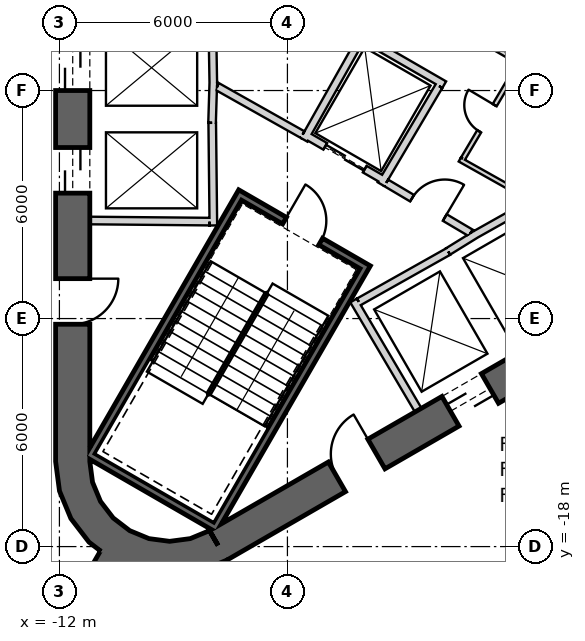
"""IFC4 building model, lengths in metres.
Left out: names, types, materials, properties, quantities, classifications, styles, units other than length and angle.
Written with IfcOpenShell. Run it as: python <this file> out.ifc"""

import sys

from ifc_helpers import new_model, si_unit, direction, frame, frame_2d, origin, place, context, subcontext, project, spatial, polyline, rectangle, outline, extrude, element, fill, save


model = new_model("IFC4")
c1 = context("Model", 3, precision=1e-05, world=origin(), true_north=direction((0.0, 1.0)))
c2 = subcontext(c1, "Body", "Model", "MODEL_VIEW")
j1 = project(units=[si_unit("LENGTHUNIT", "METRE"), si_unit("PLANEANGLEUNIT", "RADIAN")], contexts=[c1])
p1 = place(None, origin())
s1 = spatial("IfcSite", under=j1, at=p1, CompositionType="ELEMENT")
p2 = place(p1, origin())
s2 = spatial("IfcBuilding", under=s1, at=p2, CompositionType="ELEMENT")
p3 = place(p2, frame((0.0, 0.0, 131.6)))
s3 = spatial("IfcBuildingStorey", under=s2, at=p3, CompositionType="ELEMENT", Elevation=131.6)
p4 = place(p3, frame((-11.65, 15.762, 0.0), z_axis=(0.0, 0.0, 1.0), x_axis=(0.0, -1.0, 0.0)))
e1 = element("IfcWall", 1, at=p4, inside=s3, PredefinedType="SHEAR", context=c2, shape_type="SweptSolid", body=[
    extrude(rectangle(XDim=31.523, YDim=0.9, at=frame_2d((15.762, 0.0))), origin(), (0.0, 0.0, 1.0), 4.1),
])
p5 = place(p4, frame((7.062, 0.0, 0.0)))
e2 = element("IfcOpeningElement", 2, at=p5, cuts=e1, PredefinedType="OPENING", context=c2, shape_type="SweptSolid", body=[
    extrude(rectangle(XDim=1.2, YDim=2.4, at=frame_2d((0.6, 1.2))), frame((0.0, 0.46, 0.0), z_axis=(0.0, -1.0, 0.0), x_axis=(1.0, 0.0, 0.0)), (0.0, 0.0, 1.0), 0.92),
])
p6 = place(p4, frame((9.762, 0.0, 0.0)))
e3 = element("IfcOpeningElement", 3, at=p6, cuts=e1, PredefinedType="OPENING", context=c2, shape_type="SweptSolid", body=[
    extrude(rectangle(XDim=1.2, YDim=2.4, at=frame_2d((0.6, 1.2))), frame((0.0, 0.46, 0.0), z_axis=(0.0, -1.0, 0.0), x_axis=(1.0, 0.0, 0.0)), (0.0, 0.0, 1.0), 0.92),
])
p7 = place(p4, frame((12.462, 0.0, 0.0)))
e4 = element("IfcOpeningElement", 4, at=p7, cuts=e1, PredefinedType="OPENING", context=c2, shape_type="SweptSolid", body=[
    extrude(rectangle(XDim=1.2, YDim=2.4, at=frame_2d((0.6, 1.2))), frame((0.0, 0.46, 0.0), z_axis=(0.0, -1.0, 0.0), x_axis=(1.0, 0.0, 0.0)), (0.0, 0.0, 1.0), 0.92),
])
p8 = place(p4, frame((15.162, 0.0, 0.0)))
e5 = element("IfcOpeningElement", 5, at=p8, cuts=e1, PredefinedType="OPENING", context=c2, shape_type="SweptSolid", body=[
    extrude(rectangle(XDim=1.2, YDim=2.4, at=frame_2d((0.6, 1.2))), frame((0.0, 0.46, 0.0), z_axis=(0.0, -1.0, 0.0), x_axis=(1.0, 0.0, 0.0)), (0.0, 0.0, 1.0), 0.92),
])
p9 = place(p4, frame((17.862, 0.0, 0.0)))
e6 = element("IfcOpeningElement", 6, at=p9, cuts=e1, PredefinedType="OPENING", context=c2, shape_type="SweptSolid", body=[
    extrude(rectangle(XDim=1.2, YDim=2.4, at=frame_2d((0.6, 1.2))), frame((0.0, 0.46, 0.0), z_axis=(0.0, -1.0, 0.0), x_axis=(1.0, 0.0, 0.0)), (0.0, 0.0, 1.0), 0.92),
])
p10 = place(p4, frame((20.562, 0.0, 0.0)))
e7 = element("IfcOpeningElement", 7, at=p10, cuts=e1, PredefinedType="OPENING", context=c2, shape_type="SweptSolid", body=[
    extrude(rectangle(XDim=1.2, YDim=2.4, at=frame_2d((0.6, 1.2))), frame((0.0, 0.46, 0.0), z_axis=(0.0, -1.0, 0.0), x_axis=(1.0, 0.0, 0.0)), (0.0, 0.0, 1.0), 0.92),
])
p11 = place(p4, frame((23.262, 0.0, 0.0)))
e8 = element("IfcOpeningElement", 8, at=p11, cuts=e1, PredefinedType="OPENING", context=c2, shape_type="SweptSolid", body=[
    extrude(rectangle(XDim=1.2, YDim=2.4, at=frame_2d((0.6, 1.2))), frame((0.0, 0.46, 0.0), z_axis=(0.0, -1.0, 0.0), x_axis=(1.0, 0.0, 0.0)), (0.0, 0.0, 1.0), 0.92),
])
p12 = place(p4, frame((3.612, 0.0, 0.0)))
e9 = element("IfcOpeningElement", 9, at=p12, cuts=e1, PredefinedType="OPENING", context=c2, shape_type="SweptSolid", body=[
    extrude(rectangle(XDim=1.2, YDim=2.4, at=frame_2d((0.6, 1.2))), frame((0.0, 0.46, 0.0), z_axis=(0.0, -1.0, 0.0), x_axis=(1.0, 0.0, 0.0)), (0.0, 0.0, 1.0), 0.92),
])
p13 = place(p4, frame((26.712, 0.0, 0.0)))
e10 = element("IfcOpeningElement", 10, at=p13, cuts=e1, PredefinedType="OPENING", context=c2, shape_type="SweptSolid", body=[
    extrude(rectangle(XDim=1.2, YDim=2.4, at=frame_2d((0.6, 1.2))), frame((0.0, 0.46, 0.0), z_axis=(0.0, -1.0, 0.0), x_axis=(1.0, 0.0, 0.0)), (0.0, 0.0, 1.0), 0.92),
])
p14 = place(p3, frame((-7.825, -17.97, 0.0), z_axis=(0.0, 0.0, 1.0), x_axis=(0.866028369851, 0.499994862586, 0.0)))
e11 = element("IfcWall", 11, at=p14, inside=s3, PredefinedType="SHEAR", context=c2, shape_type="SweptSolid", body=[
    extrude(rectangle(XDim=31.523, YDim=0.9, at=frame_2d((15.762, 0.0))), origin(), (0.0, 0.0, 1.0), 4.1),
])
p15 = place(p14, frame((7.062, 0.0, 0.0)))
e12 = element("IfcOpeningElement", 12, at=p15, cuts=e11, PredefinedType="OPENING", context=c2, shape_type="SweptSolid", body=[
    extrude(rectangle(XDim=1.2, YDim=2.4, at=frame_2d((0.6, 1.2))), frame((0.0, 0.46, 0.0), z_axis=(0.0, -1.0, 0.0), x_axis=(1.0, 0.0, 0.0)), (0.0, 0.0, 1.0), 0.92),
])
p16 = place(p14, frame((9.762, 0.0, 0.0)))
e13 = element("IfcOpeningElement", 13, at=p16, cuts=e11, PredefinedType="OPENING", context=c2, shape_type="SweptSolid", body=[
    extrude(rectangle(XDim=1.2, YDim=2.4, at=frame_2d((0.6, 1.2))), frame((0.0, 0.46, 0.0), z_axis=(0.0, -1.0, 0.0), x_axis=(1.0, 0.0, 0.0)), (0.0, 0.0, 1.0), 0.92),
])
p17 = place(p14, frame((12.462, 0.0, 0.0)))
e14 = element("IfcOpeningElement", 14, at=p17, cuts=e11, PredefinedType="OPENING", context=c2, shape_type="SweptSolid", body=[
    extrude(rectangle(XDim=1.2, YDim=2.4, at=frame_2d((0.6, 1.2))), frame((0.0, 0.46, 0.0), z_axis=(0.0, -1.0, 0.0), x_axis=(1.0, 0.0, 0.0)), (0.0, 0.0, 1.0), 0.92),
])
p18 = place(p14, frame((15.162, 0.0, 0.0)))
e15 = element("IfcOpeningElement", 15, at=p18, cuts=e11, PredefinedType="OPENING", context=c2, shape_type="SweptSolid", body=[
    extrude(rectangle(XDim=1.2, YDim=2.4, at=frame_2d((0.6, 1.2))), frame((0.0, 0.46, 0.0), z_axis=(0.0, -1.0, 0.0), x_axis=(1.0, 0.0, 0.0)), (0.0, 0.0, 1.0), 0.92),
])
p19 = place(p14, frame((17.862, 0.0, 0.0)))
e16 = element("IfcOpeningElement", 16, at=p19, cuts=e11, PredefinedType="OPENING", context=c2, shape_type="SweptSolid", body=[
    extrude(rectangle(XDim=1.2, YDim=2.4, at=frame_2d((0.6, 1.2))), frame((0.0, 0.46, 0.0), z_axis=(0.0, -1.0, 0.0), x_axis=(1.0, 0.0, 0.0)), (0.0, 0.0, 1.0), 0.92),
])
p20 = place(p14, frame((20.562, 0.0, 0.0)))
e17 = element("IfcOpeningElement", 17, at=p20, cuts=e11, PredefinedType="OPENING", context=c2, shape_type="SweptSolid", body=[
    extrude(rectangle(XDim=1.2, YDim=2.4, at=frame_2d((0.6, 1.2))), frame((0.0, 0.46, 0.0), z_axis=(0.0, -1.0, 0.0), x_axis=(1.0, 0.0, 0.0)), (0.0, 0.0, 1.0), 0.92),
])
p21 = place(p14, frame((26.712, 0.0, 0.0)))
e18 = element("IfcOpeningElement", 18, at=p21, cuts=e11, PredefinedType="OPENING", context=c2, shape_type="SweptSolid", body=[
    extrude(rectangle(XDim=1.2, YDim=2.4, at=frame_2d((0.6, 1.2))), frame((0.0, 0.46, 0.0), z_axis=(0.0, -1.0, 0.0), x_axis=(1.0, 0.0, 0.0)), (0.0, 0.0, 1.0), 0.92),
])
p22 = place(p14, frame((3.612, 0.0, 0.0)))
e19 = element("IfcOpeningElement", 19, at=p22, cuts=e11, PredefinedType="OPENING", context=c2, shape_type="SweptSolid", body=[
    extrude(rectangle(XDim=1.2, YDim=2.4, at=frame_2d((0.6, 1.2))), frame((0.0, 0.46, 0.0), z_axis=(0.0, -1.0, 0.0), x_axis=(1.0, 0.0, 0.0)), (0.0, 0.0, 1.0), 0.92),
])
p23 = place(p3, origin())
e20 = element("IfcWall", 20, at=p23, inside=s3, PredefinedType="SHEAR", context=c2, shape_type="SweptSolid", body=[
    extrude(outline(polyline([(-12.1, -15.762), (-11.998, -16.538), (-11.698, -17.262), (-11.221, -17.883), (-10.6, -18.36), (-9.876, -18.659), (-9.1, -18.762), (-8.323, -18.659), (-7.6, -18.36), (-8.05, -17.58), (-8.556, -17.79), (-9.1, -17.862), (-9.644, -17.79), (-10.15, -17.58), (-10.585, -17.247), (-10.919, -16.812), (-11.128, -16.305), (-11.2, -15.762), (-12.1, -15.762)])), origin(), (0.0, 0.0, 1.0), 4.1),
])
p24 = place(p3, frame((-10.575, -18.316, 0.0), z_axis=(0.0, 0.0, 1.0), x_axis=(-0.500005394759, -0.866022289097, 0.0)))
e21 = element("IfcWall", 21, at=p24, inside=s3, PredefinedType="SHEAR", context=c2, shape_type="SweptSolid", body=[
    extrude(rectangle(XDim=12.598, YDim=0.8, at=frame_2d((6.299, 0.0))), origin(), (0.0, 0.0, 1.0), 4.1),
])
p25 = place(p24, frame((1.3, 0.0, 0.0)))
e22 = element("IfcOpeningElement", 22, at=p25, cuts=e21, PredefinedType="OPENING", context=c2, shape_type="SweptSolid", body=[
    extrude(rectangle(XDim=1.4, YDim=2.4, at=frame_2d((0.7, 1.2))), frame((0.0, 0.41, 0.0), z_axis=(0.0, -1.0, 0.0), x_axis=(1.0, 0.0, 0.0)), (0.0, 0.0, 1.0), 0.82),
])
p26 = place(p3, frame((-7.95, -5.772, 0.0), z_axis=(0.0, 0.0, 1.0), x_axis=(-0.030803413295, -0.999525462272, 0.0)))
e23 = element("IfcWall", 23, at=p26, inside=s3, PredefinedType="PLUMBINGWALL", context=c2, shape_type="SweptSolid", body=[
    extrude(rectangle(XDim=1.078, YDim=0.2, at=frame_2d((0.539, 0.0))), origin(), (0.0, 0.0, 1.0), 3.8),
])
p27 = place(p3, frame((-7.98, -4.05, 0.0), z_axis=(0.0, 0.0, 1.0), x_axis=(0.016809909365, -0.999858703491, 0.0)))
e24 = element("IfcWall", 24, at=p27, inside=s3, PredefinedType="PLUMBINGWALL", context=c2, shape_type="SweptSolid", body=[
    extrude(rectangle(XDim=1.844, YDim=0.2, at=frame_2d((0.922, 0.0))), origin(), (0.0, 0.0, 1.0), 3.8),
])
p28 = place(p3, frame((-7.979, -6.85, 0.0), z_axis=(0.0, 0.0, 1.0), x_axis=(0.011121475088, -0.999938154483, 0.0)))
e25 = element("IfcWall", 25, at=p28, inside=s3, PredefinedType="PLUMBINGWALL", context=c2, shape_type="SweptSolid", body=[
    extrude(rectangle(XDim=2.7, YDim=0.2, at=frame_2d((1.35, 0.0))), origin(), (0.0, 0.0, 1.0), 3.8),
])
p29 = place(p3, frame((-8.05, -9.449, 0.0), z_axis=(0.0, 0.0, 1.0), x_axis=(-0.999957467379, 0.009222983926, 0.0)))
e26 = element("IfcWall", 26, at=p29, inside=s3, PredefinedType="PLUMBINGWALL", context=c2, shape_type="SweptSolid", body=[
    extrude(rectangle(XDim=3.15, YDim=0.2, at=frame_2d((1.575, 0.0))), origin(), (0.0, 0.0, 1.0), 3.8),
])
p30 = place(p3, frame((-2.558, -14.409, 0.0), z_axis=(0.0, 0.0, 1.0), x_axis=(-0.507997497166, 0.861358544901, 0.0)))
e27 = element("IfcWall", 27, at=p30, inside=s3, PredefinedType="PLUMBINGWALL", context=c2, shape_type="SweptSolid", body=[
    extrude(rectangle(XDim=3.35, YDim=0.2, at=frame_2d((1.675, 0.0))), origin(), (0.0, 0.0, 1.0), 3.8),
])
p31 = place(p3, frame((-1.769, -10.237, 0.0), z_axis=(0.0, 0.0, 1.0), x_axis=(-0.871534483978, -0.490334215854, 0.0)))
e28 = element("IfcWall", 28, at=p31, inside=s3, PredefinedType="PLUMBINGWALL", context=c2, shape_type="SweptSolid", body=[
    extrude(rectangle(XDim=2.7, YDim=0.2, at=frame_2d((1.35, 0.0))), origin(), (0.0, 0.0, 1.0), 3.8),
])
p32 = place(p3, frame((-1.024, -9.771, 0.0), z_axis=(0.0, 0.0, 1.0), x_axis=(-0.850348075135, -0.526220629693, 0.0)))
e29 = element("IfcWall", 29, at=p32, inside=s3, PredefinedType="PLUMBINGWALL", context=c2, shape_type="SweptSolid", body=[
    extrude(rectangle(XDim=0.878, YDim=0.2, at=frame_2d((0.439, 0.0))), origin(), (0.0, 0.0, 1.0), 3.8),
])
p33 = place(p3, frame((-1.13, -9.832, 0.0), z_axis=(0.0, 0.0, 1.0), x_axis=(0.871988740738, 0.489525929882, 0.0)))
e30 = element("IfcWall", 30, at=p33, inside=s3, PredefinedType="PLUMBINGWALL", context=c2, shape_type="SweptSolid", body=[
    extrude(rectangle(XDim=1.845, YDim=0.2, at=frame_2d((0.922, 0.0))), origin(), (0.0, 0.0, 1.0), 3.8),
])
p34 = place(p3, frame((-3.905, -10.563, -0.3), z_axis=(0.0, 0.0, 1.0), x_axis=(-0.500012932018, -0.866017937352, 0.0)))
e31 = element("IfcWall", 31, at=p34, inside=s3, PredefinedType="SHEAR", context=c2, shape_type="SweptSolid", body=[
    extrude(rectangle(XDim=8.1, YDim=0.2, at=frame_2d((4.05, 0.0))), origin(), (0.0, 0.0, 1.0), 4.1),
])
p35 = place(p3, frame((-11.282, -15.541, -0.3), z_axis=(0.0, 0.0, 1.0), x_axis=(0.866000483506, -0.500043160704, 0.0)))
e32 = element("IfcWall", 32, at=p35, inside=s3, PredefinedType="SHEAR", context=c2, shape_type="SweptSolid", body=[
    extrude(rectangle(XDim=3.8, YDim=0.2, at=frame_2d((1.9, 0.0))), origin(), (0.0, 0.0, 1.0), 4.1),
])
p36 = place(p3, frame((-7.196, -8.663, -0.3), z_axis=(0.0, 0.0, 1.0), x_axis=(-0.499997992926, -0.866026562566, 0.0)))
e33 = element("IfcWall", 33, at=p36, inside=s3, PredefinedType="SHEAR", context=c2, shape_type="SweptSolid", body=[
    extrude(rectangle(XDim=7.9, YDim=0.2, at=frame_2d((3.95, 0.0))), origin(), (0.0, 0.0, 1.0), 4.1),
])
p37 = place(p3, frame((-4.041, -10.599, -0.3), z_axis=(0.0, 0.0, 1.0), x_axis=(-0.866047807691, 0.499961193289, 0.0)))
e34 = element("IfcWall", 34, at=p37, inside=s3, PredefinedType="SHEAR", context=c2, shape_type="SweptSolid", body=[
    extrude(rectangle(XDim=3.6, YDim=0.2, at=frame_2d((1.8, 0.0))), origin(), (0.0, 0.0, 1.0), 4.1),
])
p38 = place(p37, frame((1.25, 0.0, 0.3)))
e35 = element("IfcOpeningElement", 35, at=p38, cuts=e34, PredefinedType="OPENING", context=c2, shape_type="SweptSolid", body=[
    extrude(rectangle(XDim=1.1, YDim=2.1, at=frame_2d((0.55, 1.05))), frame((0.0, 0.11, 0.0), z_axis=(0.0, -1.0, 0.0), x_axis=(1.0, 0.0, 0.0)), (0.0, 0.0, 1.0), 0.22),
])
p39 = place(p3, frame((-3.446, -8.368, 0.0), z_axis=(0.0, 0.0, 1.0), x_axis=(-0.866024647952, 0.500001309137, 0.0)))
e36 = element("IfcWall", 36, at=p39, inside=s3, PredefinedType="PLUMBINGWALL", context=c2, shape_type="SweptSolid", body=[
    extrude(rectangle(XDim=2.4, YDim=0.2, at=frame_2d((1.2, 0.0))), origin(), (0.0, 0.0, 1.0), 3.8),
])
p40 = place(p39, frame((0.6, 0.0, 0.0)))
e37 = element("IfcOpeningElement", 37, at=p40, cuts=e36, PredefinedType="OPENING", context=c2, shape_type="SweptSolid", body=[
    extrude(rectangle(XDim=1.2, YDim=2.4, at=frame_2d((0.6, 1.2))), frame((0.0, 0.11, 0.0), z_axis=(0.0, -1.0, 0.0), x_axis=(1.0, 0.0, 0.0)), (0.0, 0.0, 1.0), 0.22),
])
p41 = place(p3, frame((-5.562, -7.296, 0.0), z_axis=(0.0, 0.0, 1.0), x_axis=(0.491322718731, 0.870977603649, 0.0)))
e38 = element("IfcWall", 38, at=p41, inside=s3, PredefinedType="PLUMBINGWALL", context=c2, shape_type="SweptSolid", body=[
    extrude(rectangle(XDim=3.1, YDim=0.2, at=frame_2d((1.55, 0.0))), origin(), (0.0, 0.0, 1.0), 3.8),
])
p42 = place(p3, frame((-3.957, -4.644, 0.0), z_axis=(0.0, 0.0, 1.0), x_axis=(0.865991127953, -0.500059362782, 0.0)))
e39 = element("IfcWall", 39, at=p42, inside=s3, PredefinedType="PLUMBINGWALL", context=c2, shape_type="SweptSolid", body=[
    extrude(rectangle(XDim=2.405, YDim=0.2, at=frame_2d((1.202, 0.0))), origin(), (0.0, 0.0, 1.0), 3.8),
])
p43 = place(p3, frame((-2.012, -5.882, 0.0), z_axis=(0.0, 0.0, 1.0), x_axis=(-0.508619639323, -0.860991325447, 0.0)))
e40 = element("IfcWall", 40, at=p43, inside=s3, PredefinedType="PLUMBINGWALL", context=c2, shape_type="SweptSolid", body=[
    extrude(rectangle(XDim=3.0, YDim=0.2, at=frame_2d((1.5, 0.0))), origin(), (0.0, 0.0, 1.0), 3.8),
])
p44 = place(p3, frame((-7.849, -5.894, 0.0), z_axis=(0.0, 0.0, 1.0), x_axis=(0.871340486379, -0.490678873396, 0.0)))
e41 = element("IfcWall", 41, at=p44, inside=s3, PredefinedType="PARTITIONING", context=c2, shape_type="SweptSolid", body=[
    extrude(rectangle(XDim=2.581, YDim=0.2, at=frame_2d((1.291, 0.0))), origin(), (0.0, 0.0, 1.0), 3.8),
])
p45 = place(p3, frame((-3.401, -8.43, 0.0), z_axis=(0.0, 0.0, 1.0), x_axis=(0.860598681535, -0.509283721849, 0.0)))
e42 = element("IfcWall", 42, at=p45, inside=s3, PredefinedType="PARTITIONING", context=c2, shape_type="SweptSolid", body=[
    extrude(rectangle(XDim=2.581, YDim=0.2, at=frame_2d((1.291, 0.0))), origin(), (0.0, 0.0, 1.0), 3.8),
])
p46 = place(p45, frame((0.791, 0.0, 0.0)))
e43 = element("IfcOpeningElement", 43, at=p46, cuts=e42, PredefinedType="OPENING", context=c2, shape_type="SweptSolid", body=[
    extrude(rectangle(XDim=1.0, YDim=2.1, at=frame_2d((0.5, 1.05))), frame((0.0, 0.11, 0.0), z_axis=(0.0, -1.0, 0.0), x_axis=(1.0, 0.0, 0.0)), (0.0, 0.0, 1.0), 0.22),
])
p47 = place(p3, frame((-1.464, -7.816, 0.0), z_axis=(0.0, 0.0, 1.0), x_axis=(0.871880202732, -0.489719217597, 0.0)))
e44 = element("IfcWall", 44, at=p47, inside=s3, PredefinedType="PARTITIONING", context=c2, shape_type="SweptSolid", body=[
    extrude(rectangle(XDim=2.224, YDim=0.12, at=frame_2d((1.112, 0.0))), origin(), (0.0, 0.0, 1.0), 3.8),
])
p48 = place(p3, frame((-0.119, -5.664, 0.0), z_axis=(0.0, 0.0, 1.0), x_axis=(-0.509948384343, -0.860205001907, 0.0)))
e45 = element("IfcWall", 45, at=p48, inside=s3, PredefinedType="PARTITIONING", context=c2, shape_type="SweptSolid", body=[
    extrude(rectangle(XDim=2.475, YDim=0.12, at=frame_2d((1.238, 0.0))), origin(), (0.0, 0.0, 1.0), 3.8),
])
p49 = place(p48, frame((0.838, 0.0, 0.0)))
e46 = element("IfcOpeningElement", 46, at=p49, cuts=e45, PredefinedType="OPENING", context=c2, shape_type="SweptSolid", body=[
    extrude(rectangle(XDim=0.8, YDim=2.1, at=frame_2d((0.4, 1.05))), frame((0.0, 0.07, 0.0), z_axis=(0.0, -1.0, 0.0), x_axis=(1.0, 0.0, 0.0)), (0.0, 0.0, 1.0), 0.14),
])
p50 = place(p3, frame((-1.436, -4.367, 0.0), z_axis=(0.0, 0.0, 1.0), x_axis=(0.866087547558, -0.499892348375, 0.0)))
e47 = element("IfcWall", 47, at=p50, inside=s3, PredefinedType="PARTITIONING", context=c2, shape_type="SweptSolid", body=[
    extrude(rectangle(XDim=1.7, YDim=0.12, at=frame_2d((0.85, 0.0))), origin(), (0.0, 0.0, 1.0), 3.8),
])
p51 = place(p3, frame((-0.523, -19.354, 0.0), z_axis=(0.0, 0.0, 1.0), x_axis=(0.866024925705, 0.500000828058, 0.0)))
e48 = element("IfcWall", 48, at=p51, inside=s3, PredefinedType="PARTITIONING", context=c2, shape_type="SweptSolid", body=[
    extrude(rectangle(XDim=26.647, YDim=0.2, at=frame_2d((13.323, 0.0))), origin(), (0.0, 0.0, 1.0), 2.98),
])
p52 = place(p51, frame((21.145, 0.0, 0.0)))
e49 = element("IfcOpeningElement", 49, at=p52, cuts=e48, PredefinedType="OPENING", context=c2, shape_type="SweptSolid", body=[
    extrude(rectangle(XDim=1.0, YDim=2.1, at=frame_2d((0.5, 1.05))), frame((0.0, 0.11, 0.0), z_axis=(0.0, -1.0, 0.0), x_axis=(1.0, 0.0, 0.0)), (0.0, 0.0, 1.0), 0.22),
])
p53 = place(p51, frame((9.691, 0.0, 0.0)))
e50 = element("IfcOpeningElement", 50, at=p53, cuts=e48, PredefinedType="OPENING", context=c2, shape_type="SweptSolid", body=[
    extrude(rectangle(XDim=1.0, YDim=2.1, at=frame_2d((0.5, 1.05))), frame((0.0, 0.11, 0.0), z_axis=(0.0, -1.0, 0.0), x_axis=(1.0, 0.0, 0.0)), (0.0, 0.0, 1.0), 0.22),
])
p54 = place(p51, frame((1.369, 0.0, 0.0)))
e51 = element("IfcOpeningElement", 51, at=p54, cuts=e48, PredefinedType="OPENING", context=c2, shape_type="SweptSolid", body=[
    extrude(rectangle(XDim=1.0, YDim=2.1, at=frame_2d((0.5, 1.05))), frame((0.0, 0.11, 0.0), z_axis=(0.0, -1.0, 0.0), x_axis=(1.0, 0.0, 0.0)), (0.0, 0.0, 1.0), 0.22),
])
p55 = place(p38, origin())
e52 = element("IfcDoor", 52, at=p55, inside=s3, OperationType="SINGLE_SWING_LEFT", PredefinedType="USERDEFINED", context=c2, shape_type="SweptSolid", body=[
    extrude(rectangle(XDim=1.1, YDim=2.1, at=frame_2d((0.55, 1.05))), frame((0.0, 0.025, 0.0), z_axis=(0.0, -1.0, 0.0), x_axis=(1.0, 0.0, 0.0)), (0.0, 0.0, 1.0), 0.05),
])
fill(e35, e52)
p56 = place(p46, origin())
e53 = element("IfcDoor", 53, at=p56, inside=s3, OperationType="SINGLE_SWING_RIGHT", PredefinedType="USERDEFINED", context=c2, shape_type="SweptSolid", body=[
    extrude(rectangle(XDim=1.0, YDim=2.1, at=frame_2d((0.5, 1.05))), frame((0.0, 0.025, 0.0), z_axis=(0.0, -1.0, 0.0), x_axis=(1.0, 0.0, 0.0)), (0.0, 0.0, 1.0), 0.05),
])
fill(e43, e53)
p57 = place(p40, origin())
e54 = element("IfcDoor", 54, at=p57, inside=s3, OperationType="SLIDING_TO_LEFT", PredefinedType="USERDEFINED", context=c2, shape_type="SweptSolid", body=[
    extrude(rectangle(XDim=1.2, YDim=2.4, at=frame_2d((0.6, 1.2))), frame((0.0, 0.025, 0.0), z_axis=(0.0, -1.0, 0.0), x_axis=(1.0, 0.0, 0.0)), (0.0, 0.0, 1.0), 0.05),
])
fill(e37, e54)
p58 = place(p49, origin())
e55 = element("IfcDoor", 55, at=p58, inside=s3, OperationType="SINGLE_SWING_LEFT", PredefinedType="USERDEFINED", context=c2, shape_type="SweptSolid", body=[
    extrude(rectangle(XDim=0.8, YDim=2.1, at=frame_2d((0.4, 1.05))), frame((0.0, 0.025, 0.0), z_axis=(0.0, -1.0, 0.0), x_axis=(1.0, 0.0, 0.0)), (0.0, 0.0, 1.0), 0.05),
])
fill(e46, e55)
p59 = place(p10, origin())
e56 = element("IfcDoor", 56, at=p59, inside=s3, OperationType="SLIDING_TO_LEFT", PredefinedType="USERDEFINED", context=c2, shape_type="SweptSolid", body=[
    extrude(rectangle(XDim=1.2, YDim=2.4, at=frame_2d((0.6, 1.2))), frame((0.0, 0.025, 0.0), z_axis=(0.0, -1.0, 0.0), x_axis=(1.0, 0.0, 0.0)), (0.0, 0.0, 1.0), 0.05),
])
fill(e7, e56)
p60 = place(p11, origin())
e57 = element("IfcDoor", 57, at=p60, inside=s3, OperationType="SLIDING_TO_LEFT", PredefinedType="USERDEFINED", context=c2, shape_type="SweptSolid", body=[
    extrude(rectangle(XDim=1.2, YDim=2.4, at=frame_2d((0.6, 1.2))), frame((0.0, 0.025, 0.0), z_axis=(0.0, -1.0, 0.0), x_axis=(1.0, 0.0, 0.0)), (0.0, 0.0, 1.0), 0.05),
])
fill(e8, e57)
p61 = place(p15, origin())
e58 = element("IfcDoor", 58, at=p61, inside=s3, OperationType="SLIDING_TO_LEFT", PredefinedType="USERDEFINED", context=c2, shape_type="SweptSolid", body=[
    extrude(rectangle(XDim=1.2, YDim=2.4, at=frame_2d((0.6, 1.2))), frame((0.0, 0.025, 0.0), z_axis=(0.0, -1.0, 0.0), x_axis=(1.0, 0.0, 0.0)), (0.0, 0.0, 1.0), 0.05),
])
fill(e12, e58)
p62 = place(p13, origin())
e59 = element("IfcDoor", 59, at=p62, inside=s3, OperationType="SINGLE_SWING_LEFT", PredefinedType="USERDEFINED", context=c2, shape_type="SweptSolid", body=[
    extrude(rectangle(XDim=1.2, YDim=2.4, at=frame_2d((0.6, 1.2))), frame((0.0, 0.025, 0.0), z_axis=(0.0, -1.0, 0.0), x_axis=(1.0, 0.0, 0.0)), (0.0, 0.0, 1.0), 0.05),
])
fill(e10, e59)
p63 = place(p22, origin())
e60 = element("IfcDoor", 60, at=p63, inside=s3, OperationType="SINGLE_SWING_RIGHT", PredefinedType="USERDEFINED", context=c2, shape_type="SweptSolid", body=[
    extrude(rectangle(XDim=1.2, YDim=2.4, at=frame_2d((0.6, 1.2))), frame((0.0, 0.025, 0.0), z_axis=(0.0, -1.0, 0.0), x_axis=(1.0, 0.0, 0.0)), (0.0, 0.0, 1.0), 0.05),
])
fill(e19, e60)
save(model, sys.argv[1])
